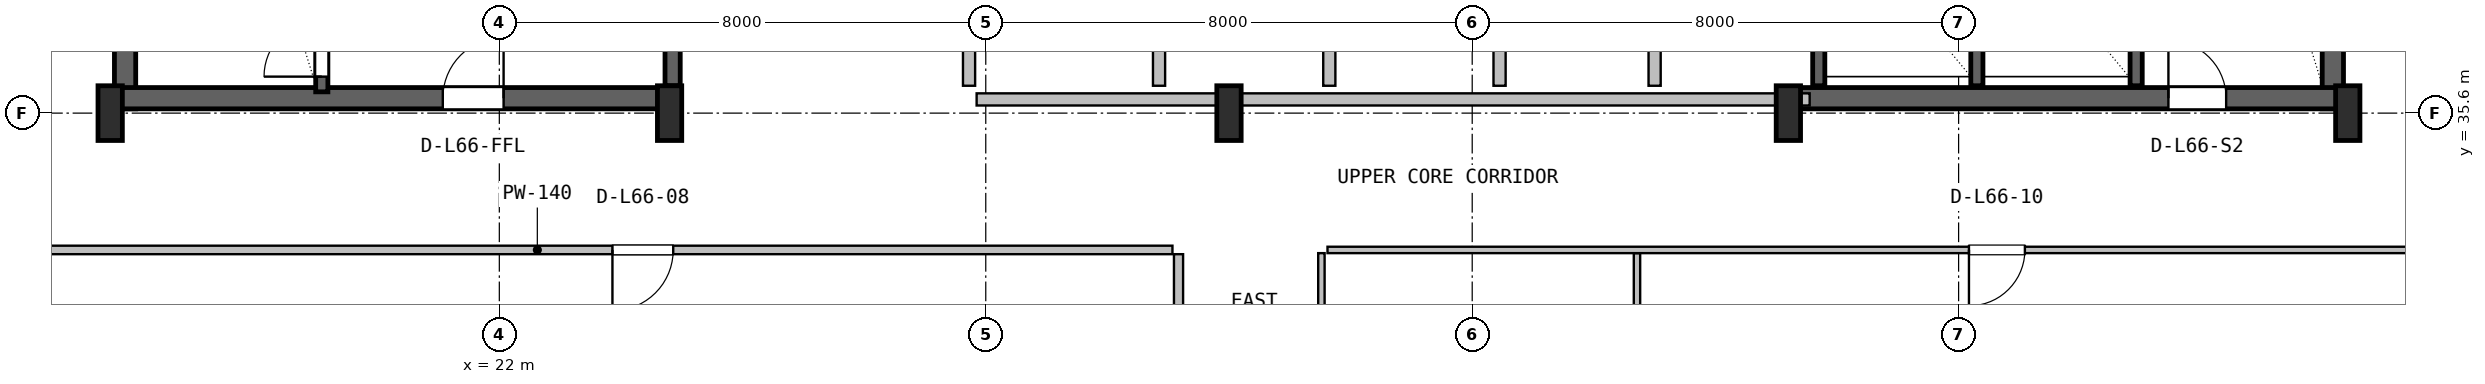
"""IFC4 building model, lengths in metres.
Left out: names, types, materials, properties, quantities, classifications, styles, units other than length and angle.
Written with IfcOpenShell. Run it as: python <this file> out.ifc"""

import sys

from ifc_helpers import new_model, si_unit, direction, frame, frame_2d, origin, origin_2d, place, context, subcontext, project, spatial, rectangle, i_section, extrude, source, transform, mapped, element, fill, save


model = new_model("IFC4")
c1 = context("Model", 3, precision=1e-05, world=origin(), true_north=direction((0.0, 1.0)))
c2 = subcontext(c1, "Body", "Model", "MODEL_VIEW")
j1 = project(units=[si_unit("LENGTHUNIT", "METRE"), si_unit("PLANEANGLEUNIT", "RADIAN")], contexts=[c1])
p1 = place(None, origin())
s1 = spatial("IfcSite", under=j1, at=p1, CompositionType="ELEMENT")
p2 = place(p1, origin())
s2 = spatial("IfcBuilding", under=s1, at=p2, CompositionType="ELEMENT")
p3 = place(p2, frame((0.0, 0.0, 266.0)))
s3 = spatial("IfcBuildingStorey", under=s2, at=p3, CompositionType="ELEMENT", Elevation=266.0)
for number, where, z_axis, x_axis in (
    (1, (15.845, 35.67, 0.0), (0.0, 0.0, 1.0), (0.0, 1.0, 0.0)),
    (2, (52.155, 35.67, 0.0), (0.0, 0.0, 1.0), (0.0, 1.0, 0.0)),
):
    element("IfcWall", number, at=place(p3, frame(where, z_axis=z_axis, x_axis=x_axis)), inside=s3, PredefinedType="SHEAR", context=c2, shape_type="SweptSolid", body=[
        extrude(rectangle(XDim=11.13, YDim=0.35, at=frame_2d((5.565, 0.0))), origin(), (0.0, 0.0, 1.0), 3.55),
    ])
p4 = place(p3, frame((15.67, 35.845, 0.0), z_axis=(0.0, 0.0, 1.0), x_axis=(1.0, 0.0, 0.0)))
e3 = element("IfcWall", 3, at=p4, inside=s3, PredefinedType="SHEAR", context=c2, shape_type="SweptSolid", body=[
    extrude(rectangle(XDim=9.13, YDim=0.35, at=frame_2d((4.565, 0.0))), origin(), (0.0, 0.0, 1.0), 3.55),
])
p5 = place(p4, frame((5.4, 0.0, 0.0)))
e4 = element("IfcOpeningElement", 4, at=p5, cuts=e3, PredefinedType="OPENING", context=c2, shape_type="SweptSolid", body=[
    extrude(rectangle(XDim=1.0, YDim=2.1, at=frame_2d((0.5, 1.05))), frame((0.0, 0.185, 0.0), z_axis=(0.0, -1.0, 0.0), x_axis=(1.0, 0.0, 0.0)), (0.0, 0.0, 1.0), 0.37),
])
p6 = place(p3, frame((43.2, 35.845, 0.0), z_axis=(0.0, 0.0, 1.0), x_axis=(1.0, 0.0, 0.0)))
e5 = element("IfcWall", 5, at=p6, inside=s3, PredefinedType="SHEAR", context=c2, shape_type="SweptSolid", body=[
    extrude(rectangle(XDim=9.13, YDim=0.35, at=frame_2d((4.565, 0.0))), origin(), (0.0, 0.0, 1.0), 3.55),
])
p7 = place(p6, frame((6.25, 0.0, 0.0)))
e6 = element("IfcOpeningElement", 6, at=p7, cuts=e5, PredefinedType="OPENING", context=c2, shape_type="SweptSolid", body=[
    extrude(rectangle(XDim=0.95, YDim=2.1, at=frame_2d((0.475, 1.05))), frame((0.0, 0.185, 0.0), z_axis=(0.0, -1.0, 0.0), x_axis=(1.0, 0.0, 0.0)), (0.0, 0.0, 1.0), 0.37),
])
m1 = source(origin(), c2, "Body", "SweptSolid", [
    extrude(i_section(OverallWidth=0.4, OverallDepth=0.9, WebThickness=0.016, FlangeThickness=0.028, FilletRadius=0.016, at=origin_2d()), origin(), (0.0, 0.0, 1.0), 3.8),
])
for number, where, z_axis, x_axis in (
    (7, (15.6, 35.6, 0.0), (0.0, 0.0, 1.0), (1.0, 0.0, 0.0)),
    (8, (24.8, 35.6, 0.0), (0.0, 0.0, 1.0), (1.0, 0.0, 0.0)),
    (9, (34.0, 35.6, 0.0), (0.0, 0.0, 1.0), (1.0, 0.0, 0.0)),
    (10, (43.2, 35.6, 0.0), (0.0, 0.0, 1.0), (1.0, 0.0, 0.0)),
    (11, (52.4, 35.6, 0.0), (0.0, 0.0, 1.0), (1.0, 0.0, 0.0)),
):
    element("IfcColumn", number, at=place(p3, frame(where, z_axis=z_axis, x_axis=x_axis)), inside=s3, PredefinedType="COLUMN", context=c2, shape_type="MappedRepresentation", body=[
        mapped(m1, transform((0.0, 0.0, 0.0), x_axis=(1.0, 0.0, 0.0), y_axis=(0.0, 1.0, 0.0), z_axis=(0.0, 0.0, 1.0), scale=1.0)),
    ])
p8 = place(p3, frame((19.08, 35.95, 0.0), z_axis=(0.0, 0.0, 1.0), x_axis=(0.0, 1.0, 0.0)))
e12 = element("IfcWall", 12, at=p8, inside=s3, PredefinedType="SHEAR", context=c2, shape_type="SweptSolid", body=[
    extrude(rectangle(XDim=9.65, YDim=0.2, at=frame_2d((4.825, 0.0))), origin(), (0.0, 0.0, 1.0), 3.55),
])
p9 = place(p8, frame((0.25, 0.0, 0.0)))
e13 = element("IfcOpeningElement", 13, at=p9, cuts=e12, PredefinedType="OPENING", context=c2, shape_type="SweptSolid", body=[
    extrude(rectangle(XDim=0.95, YDim=2.1, at=frame_2d((0.475, 1.05))), frame((0.0, 0.11, 0.0), z_axis=(0.0, -1.0, 0.0), x_axis=(1.0, 0.0, 0.0)), (0.0, 0.0, 1.0), 0.22),
])
p10 = place(p3, frame((24.85, 36.05, 0.0), z_axis=(0.0, 0.0, 1.0), x_axis=(0.0, 1.0, 0.0)))
e14 = element("IfcWall", 14, at=p10, inside=s3, PredefinedType="SHEAR", context=c2, shape_type="SweptSolid", body=[
    extrude(rectangle(XDim=10.45, YDim=0.25, at=frame_2d((5.225, 0.0))), origin(), (0.0, 0.0, 1.0), 3.55),
])
p11 = place(p3, frame((48.92, 36.05, 0.0), z_axis=(0.0, 0.0, 1.0), x_axis=(0.0, 1.0, 0.0)))
e15 = element("IfcWall", 15, at=p11, inside=s3, PredefinedType="SHEAR", context=c2, shape_type="SweptSolid", body=[
    extrude(rectangle(XDim=10.5, YDim=0.2, at=frame_2d((5.25, 0.0))), origin(), (0.0, 0.0, 1.0), 3.55),
])
for number, where, z_axis, x_axis in (
    (16, (43.7, 36.05, 0.0), (0.0, 0.0, 1.0), (0.0, 1.0, 0.0)),
    (17, (46.3, 36.05, 0.0), (0.0, 0.0, 1.0), (0.0, 1.0, 0.0)),
):
    element("IfcWall", number, at=place(p3, frame(where, z_axis=z_axis, x_axis=x_axis)), inside=s3, PredefinedType="SHEAR", context=c2, shape_type="SweptSolid", body=[
        extrude(rectangle(XDim=3.05, YDim=0.2, at=frame_2d((1.525, 0.0))), origin(), (0.0, 0.0, 1.0), 3.55),
    ])
p12 = place(p3, frame((29.85, 35.825, 0.0), z_axis=(0.0, 0.0, 1.0), x_axis=(1.0, 0.0, 0.0)))
e18 = element("IfcWall", 18, at=p12, inside=s3, PredefinedType="SOLIDWALL", context=c2, shape_type="SweptSolid", body=[
    extrude(rectangle(XDim=13.7, YDim=0.2, at=frame_2d((6.85, 0.0))), origin(), (0.0, 0.0, 1.0), 2.575),
])
for number, where, z_axis, x_axis in (
    (19, (32.85, 36.05, 0.0), (0.0, 0.0, 1.0), (0.0, 1.0, 0.0)),
    (20, (29.725, 36.05, 0.0), (0.0, 0.0, 1.0), (0.0, 1.0, 0.0)),
    (21, (35.65, 36.05, 0.0), (0.0, 0.0, 1.0), (0.0, 1.0, 0.0)),
    (22, (38.45, 36.05, 0.0), (0.0, 0.0, 1.0), (0.0, 1.0, 0.0)),
):
    element("IfcWall", number, at=place(p3, frame(where, z_axis=z_axis, x_axis=x_axis)), inside=s3, PredefinedType="PLUMBINGWALL", context=c2, shape_type="SweptSolid", body=[
        extrude(rectangle(XDim=3.1, YDim=0.2, at=frame_2d((1.55, 0.0))), origin(), (0.0, 0.0, 1.0), 3.53),
    ])
p13 = place(p3, frame((41.0, 36.05, 0.0), z_axis=(0.0, 0.0, 1.0), x_axis=(0.0, 1.0, 0.0)))
e23 = element("IfcWall", 23, at=p13, inside=s3, PredefinedType="SOLIDWALL", context=c2, shape_type="SweptSolid", body=[
    extrude(rectangle(XDim=3.1, YDim=0.2, at=frame_2d((1.55, 0.0))), origin(), (0.0, 0.0, 1.0), 3.53),
])
p14 = place(p3, frame((33.17, 21.665, 0.0), z_axis=(0.0, 0.0, 1.0), x_axis=(0.0, 1.0, 0.0)))
e24 = element("IfcWall", 24, at=p14, inside=s3, PredefinedType="PARTITIONING", context=c2, shape_type="SweptSolid", body=[
    extrude(rectangle(XDim=11.615, YDim=0.15, at=frame_2d((5.808, 0.0))), origin(), (0.0, 0.0, 1.0), 2.981),
])
p15 = place(p3, frame((12.18, 33.35, 0.0), z_axis=(0.0, 0.0, 1.0), x_axis=(1.0, 0.0, 0.0)))
e25 = element("IfcWall", 25, at=p15, inside=s3, PredefinedType="PARTITIONING", context=c2, shape_type="SweptSolid", body=[
    extrude(rectangle(XDim=20.89, YDim=0.14, at=frame_2d((10.445, 0.0))), origin(), (0.0, 0.0, 1.0), 2.981),
])
p16 = place(p15, frame((11.68, 0.0, 0.0)))
e26 = element("IfcOpeningElement", 26, at=p16, cuts=e25, PredefinedType="OPENING", context=c2, shape_type="SweptSolid", body=[
    extrude(rectangle(XDim=1.0, YDim=2.1, at=frame_2d((0.5, 1.05))), frame((0.0, 0.08, 0.0), z_axis=(0.0, -1.0, 0.0), x_axis=(1.0, 0.0, 0.0)), (0.0, 0.0, 1.0), 0.16),
])
p17 = place(p3, frame((40.71, 13.38, 0.0), z_axis=(0.0, 0.0, 1.0), x_axis=(0.0, 1.0, 0.0)))
e27 = element("IfcWall", 27, at=p17, inside=s3, PredefinedType="PARTITIONING", context=c2, shape_type="SweptSolid", body=[
    extrude(rectangle(XDim=19.917, YDim=0.105, at=frame_2d((9.958, 0.0))), origin(), (0.0, 0.0, 1.0), 2.981),
])
p18 = place(p3, frame((35.62, 33.35, 0.0), z_axis=(0.0, 0.0, 1.0), x_axis=(1.0, 0.0, 0.0)))
e28 = element("IfcWall", 28, at=p18, inside=s3, PredefinedType="PARTITIONING", context=c2, shape_type="SweptSolid", body=[
    extrude(rectangle(XDim=20.2, YDim=0.105, at=frame_2d((10.1, 0.0))), origin(), (0.0, 0.0, 1.0), 2.981),
])
p19 = place(p18, frame((10.55, 0.0, 0.0)))
e29 = element("IfcOpeningElement", 29, at=p19, cuts=e28, PredefinedType="OPENING", context=c2, shape_type="SweptSolid", body=[
    extrude(rectangle(XDim=0.92, YDim=2.08, at=frame_2d((0.46, 1.04))), frame((0.0, 0.062, 0.0), z_axis=(0.0, -1.0, 0.0), x_axis=(1.0, 0.0, 0.0)), (0.0, 0.0, 1.0), 0.125),
])
p20 = place(p3, frame((35.52, 13.38, 0.0), z_axis=(0.0, 0.0, 1.0), x_axis=(0.0, 1.0, 0.0)))
e30 = element("IfcWall", 30, at=p20, inside=s3, PredefinedType="PARTITIONING", context=c2, shape_type="SweptSolid", body=[
    extrude(rectangle(XDim=19.917, YDim=0.105, at=frame_2d((9.958, 0.0))), origin(), (0.0, 0.0, 1.0), 2.981),
])
p21 = place(p20, frame((9.95, 0.0, 0.0)))
e31 = element("IfcOpeningElement", 31, at=p21, cuts=e30, PredefinedType="OPENING", context=c2, shape_type="SweptSolid", body=[
    extrude(rectangle(XDim=0.88, YDim=2.06, at=frame_2d((0.44, 1.03))), frame((0.0, 0.062, 0.0), z_axis=(0.0, -1.0, 0.0), x_axis=(1.0, 0.0, 0.0)), (0.0, 0.0, 1.0), 0.125),
])
m2 = source(origin(), c2, "Body", "SweptSolid", [
    extrude(rectangle(XDim=0.95, YDim=2.1, at=frame_2d((0.475, 1.05))), frame((0.0, 0.025, 0.0), z_axis=(0.0, -1.0, 0.0), x_axis=(1.0, 0.0, 0.0)), (0.0, 0.0, 1.0), 0.05),
])
p22 = place(p9, origin())
e32 = element("IfcDoor", 32, at=p22, inside=s3, OperationType="SINGLE_SWING_LEFT", PredefinedType="DOOR", context=c2, shape_type="MappedRepresentation", body=[
    mapped(m2, transform((0.0, 0.0, 0.0), x_axis=(1.0, 0.0, 0.0), y_axis=(0.0, 1.0, 0.0), z_axis=(0.0, 0.0, 1.0), scale=1.0)),
])
fill(e13, e32)
m3 = source(origin(), c2, "Body", "SweptSolid", [
    extrude(rectangle(XDim=1.0, YDim=2.1, at=frame_2d((0.5, 1.05))), frame((0.0, 0.025, 0.0), z_axis=(0.0, -1.0, 0.0), x_axis=(1.0, 0.0, 0.0)), (0.0, 0.0, 1.0), 0.05),
])
p23 = place(p5, origin())
e33 = element("IfcDoor", 33, at=p23, inside=s3, OperationType="SINGLE_SWING_RIGHT", PredefinedType="DOOR", context=c2, shape_type="MappedRepresentation", body=[
    mapped(m3, transform((0.0, 0.0, 0.0), x_axis=(1.0, 0.0, 0.0), y_axis=(0.0, 1.0, 0.0), z_axis=(0.0, 0.0, 1.0), scale=1.0)),
])
fill(e4, e33)
p24 = place(p7, origin())
e34 = element("IfcDoor", 34, at=p24, inside=s3, OperationType="SINGLE_SWING_LEFT", PredefinedType="DOOR", context=c2, shape_type="MappedRepresentation", body=[
    mapped(m2, transform((0.0, 0.0, 0.0), x_axis=(1.0, 0.0, 0.0), y_axis=(0.0, 1.0, 0.0), z_axis=(0.0, 0.0, 1.0), scale=1.0)),
])
fill(e6, e34)
m4 = source(origin(), c2, "Body", "SweptSolid", [
    extrude(rectangle(XDim=1.0, YDim=2.1, at=frame_2d((0.5, 1.05))), frame((0.0, 0.025, 0.0), z_axis=(0.0, -1.0, 0.0), x_axis=(1.0, 0.0, 0.0)), (0.0, 0.0, 1.0), 0.05),
])
p25 = place(p16, frame((1.0, 0.0, 0.0), z_axis=(0.0, 0.0, 1.0), x_axis=(-1.0, 0.0, 0.0)))
e35 = element("IfcDoor", 35, at=p25, inside=s3, OperationType="SINGLE_SWING_LEFT", PredefinedType="DOOR", context=c2, shape_type="MappedRepresentation", body=[
    mapped(m4, transform((0.0, 0.0, 0.0), x_axis=(1.0, 0.0, 0.0), y_axis=(0.0, 1.0, 0.0), z_axis=(0.0, 0.0, 1.0), scale=1.0)),
])
fill(e26, e35)
m5 = source(origin(), c2, "Body", "SweptSolid", [
    extrude(rectangle(XDim=0.92, YDim=2.08, at=frame_2d((0.46, 1.04))), frame((0.0, 0.025, 0.0), z_axis=(0.0, -1.0, 0.0), x_axis=(1.0, 0.0, 0.0)), (0.0, 0.0, 1.0), 0.05),
])
p26 = place(p19, frame((0.92, 0.0, 0.0), z_axis=(0.0, 0.0, 1.0), x_axis=(-1.0, 0.0, 0.0)))
e36 = element("IfcDoor", 36, at=p26, inside=s3, OperationType="SINGLE_SWING_LEFT", PredefinedType="DOOR", context=c2, shape_type="MappedRepresentation", body=[
    mapped(m5, transform((0.0, 0.0, 0.0), x_axis=(1.0, 0.0, 0.0), y_axis=(0.0, 1.0, 0.0), z_axis=(0.0, 0.0, 1.0), scale=1.0)),
])
fill(e29, e36)
save(model, sys.argv[1])
